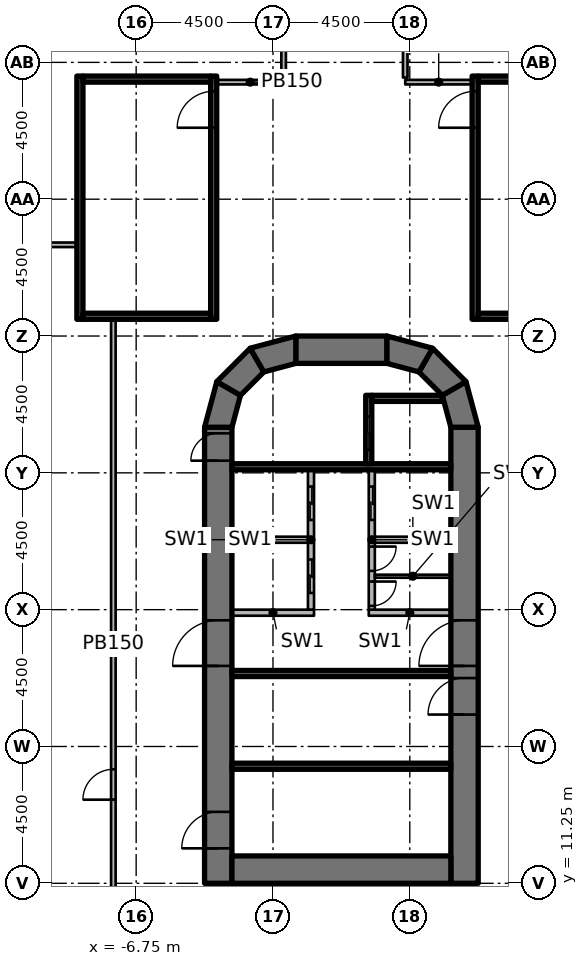
"""IFC4 building model, lengths in metres.
Left out: names, types, materials, properties, quantities, classifications, styles, units other than length and angle.
Written with IfcOpenShell. Run it as: python <this file> out.ifc"""

import sys

from ifc_helpers import new_model, si_unit, direction, frame, frame_2d, origin, origin_2d, place, context, subcontext, project, spatial, polyline, rectangle, outline, extrude, element, fill, save


model = new_model("IFC4")
c1 = context("Model", 3, precision=1e-05, world=origin(), true_north=direction((0.0, 1.0)))
c2 = subcontext(c1, "Body", "Model", "MODEL_VIEW")
j1 = project(units=[si_unit("LENGTHUNIT", "METRE"), si_unit("PLANEANGLEUNIT", "RADIAN")], contexts=[c1])
p1 = place(None, origin())
s1 = spatial("IfcSite", under=j1, at=p1, CompositionType="ELEMENT")
p2 = place(p1, origin())
s2 = spatial("IfcBuilding", under=s1, at=p2, CompositionType="ELEMENT")
p3 = place(p2, frame((0.0, 0.0, 7.0)))
s3 = spatial("IfcBuildingStorey", under=s2, at=p3, CompositionType="ELEMENT", Elevation=7.0)
for number, where, z_axis, x_axis in (
    (1, (-6.25, 10.75, 0.0), (0.0, 0.0, 1.0), (1.0, 0.0, 0.0)),
    (2, (-6.25, 15.75, 0.0), (0.0, 0.0, 1.0), (1.0, 0.0, 0.0)),
    (3, (-6.25, 20.25, 0.0), (0.0, 0.0, 1.0), (1.0, 0.0, 0.0)),
    (4, (-6.25, 24.65, 0.0), (0.0, 0.0, 1.0), (1.0, 0.0, 0.0)),
    (5, (-6.25, 26.7, 0.0), (0.0, 0.0, 1.0), (1.0, 0.0, 0.0)),
    (6, (-2.25, 33.11, 0.0), (0.0, 0.0, 1.0), (1.0, 0.0, 0.0)),
    (7, (2.25, 33.11, 0.0), (0.0, 0.0, 1.0), (1.0, 0.0, 0.0)),
):
    element("IfcColumn", number, at=place(p3, frame(where, z_axis=z_axis, x_axis=x_axis)), inside=s3, PredefinedType="COLUMN", context=c2, shape_type="SweptSolid", body=[
        extrude(rectangle(XDim=1.2, YDim=1.2, at=origin_2d()), origin(), (0.0, 0.0, 1.0), 4.55),
    ])
p4 = place(p3, frame((-4.05, 11.25, 0.0), z_axis=(0.0, 0.0, 1.0), x_axis=(0.0, 1.0, 0.0)))
e8 = element("IfcWall", 8, at=p4, inside=s3, PredefinedType="SHEAR", context=c2, shape_type="SweptSolid", body=[
    extrude(rectangle(XDim=15.0, YDim=0.9, at=frame_2d((7.5, 0.0))), origin(), (0.0, 0.0, 1.0), 5.0),
])
p5 = place(p4, frame((7.15, 0.0, 0.0)))
e9 = element("IfcOpeningElement", 9, at=p5, cuts=e8, PredefinedType="OPENING", context=c2, shape_type="SweptSolid", body=[
    extrude(rectangle(XDim=1.5, YDim=2.3, at=frame_2d((0.75, 1.15))), frame((0.0, 0.46, 0.0), z_axis=(0.0, -1.0, 0.0), x_axis=(1.0, 0.0, 0.0)), (0.0, 0.0, 1.0), 0.92),
])
p6 = place(p4, frame((13.9, 0.0, 0.0)))
e10 = element("IfcOpeningElement", 10, at=p6, cuts=e8, PredefinedType="OPENING", context=c2, shape_type="SweptSolid", body=[
    extrude(rectangle(XDim=0.9, YDim=2.1, at=frame_2d((0.45, 1.05))), frame((0.0, 0.46, 0.0), z_axis=(0.0, -1.0, 0.0), x_axis=(1.0, 0.0, 0.0)), (0.0, 0.0, 1.0), 0.92),
])
p7 = place(p4, frame((1.15, 0.0, 0.0)))
e11 = element("IfcOpeningElement", 11, at=p7, cuts=e8, PredefinedType="OPENING", context=c2, shape_type="SweptSolid", body=[
    extrude(rectangle(XDim=1.2, YDim=2.1, at=frame_2d((0.6, 1.05))), frame((0.0, 0.46, 0.0), z_axis=(0.0, -1.0, 0.0), x_axis=(1.0, 0.0, 0.0)), (0.0, 0.0, 1.0), 0.92),
])
p8 = place(p3, frame((4.05, 11.25, 0.0), z_axis=(0.0, 0.0, 1.0), x_axis=(0.0, 1.0, 0.0)))
e12 = element("IfcWall", 12, at=p8, inside=s3, PredefinedType="SHEAR", context=c2, shape_type="SweptSolid", body=[
    extrude(rectangle(XDim=15.0, YDim=0.9, at=frame_2d((7.5, 0.0))), origin(), (0.0, 0.0, 1.0), 5.0),
])
p9 = place(p8, frame((7.15, 0.0, 0.0)))
e13 = element("IfcOpeningElement", 13, at=p9, cuts=e12, PredefinedType="OPENING", context=c2, shape_type="SweptSolid", body=[
    extrude(rectangle(XDim=1.5, YDim=2.3, at=frame_2d((0.75, 1.15))), frame((0.0, 0.46, 0.0), z_axis=(0.0, -1.0, 0.0), x_axis=(1.0, 0.0, 0.0)), (0.0, 0.0, 1.0), 0.92),
])
p10 = place(p8, frame((5.55, 0.0, 0.0)))
e14 = element("IfcOpeningElement", 14, at=p10, cuts=e12, PredefinedType="OPENING", context=c2, shape_type="SweptSolid", body=[
    extrude(rectangle(XDim=1.2, YDim=2.1, at=frame_2d((0.6, 1.05))), frame((0.0, 0.46, 0.0), z_axis=(0.0, -1.0, 0.0), x_axis=(1.0, 0.0, 0.0)), (0.0, 0.0, 1.0), 0.92),
])
p11 = place(p3, frame((-3.6, 11.7, 0.0), z_axis=(0.0, 0.0, 1.0), x_axis=(1.0, 0.0, 0.0)))
e15 = element("IfcWall", 15, at=p11, inside=s3, PredefinedType="SHEAR", context=c2, shape_type="SweptSolid", body=[
    extrude(rectangle(XDim=7.2, YDim=0.9, at=frame_2d((3.6, 0.0))), origin(), (0.0, 0.0, 1.0), 5.0),
])
p12 = place(p3, frame((-1.5, 28.8, 0.0), z_axis=(0.0, 0.0, 1.0), x_axis=(1.0, 0.0, 0.0)))
e16 = element("IfcWall", 16, at=p12, inside=s3, PredefinedType="SHEAR", context=c2, shape_type="SweptSolid", body=[
    extrude(rectangle(XDim=3.0, YDim=0.9, at=frame_2d((1.5, 0.0))), origin(), (0.0, 0.0, 1.0), 5.0),
])
p13 = place(p3, origin())
e17 = element("IfcWall", 17, at=p13, inside=s3, PredefinedType="SHEAR", context=c2, shape_type="SweptSolid", body=[
    extrude(outline(polyline([(-4.5, 26.25), (-4.098, 27.75), (-3.319, 27.3), (-3.6, 26.25), (-4.5, 26.25)])), origin(), (0.0, 0.0, 1.0), 5.0),
])
p14 = place(p3, origin())
e18 = element("IfcWall", 18, at=p14, inside=s3, PredefinedType="SHEAR", context=c2, shape_type="SweptSolid", body=[
    extrude(outline(polyline([(-4.098, 27.75), (-3.0, 28.848), (-2.55, 28.069), (-3.319, 27.3), (-4.098, 27.75)])), origin(), (0.0, 0.0, 1.0), 5.0),
])
p15 = place(p3, origin())
e19 = element("IfcWall", 19, at=p15, inside=s3, PredefinedType="SHEAR", context=c2, shape_type="SweptSolid", body=[
    extrude(outline(polyline([(-3.0, 28.848), (-1.5, 29.25), (-1.5, 28.35), (-2.55, 28.069), (-3.0, 28.848)])), origin(), (0.0, 0.0, 1.0), 5.0),
])
p16 = place(p3, origin())
e20 = element("IfcWall", 20, at=p16, inside=s3, PredefinedType="SHEAR", context=c2, shape_type="SweptSolid", body=[
    extrude(outline(polyline([(4.5, 26.25), (4.098, 27.75), (3.319, 27.3), (3.6, 26.25), (4.5, 26.25)])), origin(), (0.0, 0.0, 1.0), 5.0),
])
p17 = place(p3, origin())
e21 = element("IfcWall", 21, at=p17, inside=s3, PredefinedType="SHEAR", context=c2, shape_type="SweptSolid", body=[
    extrude(outline(polyline([(4.098, 27.75), (3.0, 28.848), (2.55, 28.069), (3.319, 27.3), (4.098, 27.75)])), origin(), (0.0, 0.0, 1.0), 5.0),
])
p18 = place(p3, origin())
e22 = element("IfcWall", 22, at=p18, inside=s3, PredefinedType="SHEAR", context=c2, shape_type="SweptSolid", body=[
    extrude(outline(polyline([(3.0, 28.848), (1.5, 29.25), (1.5, 28.35), (2.55, 28.069), (3.0, 28.848)])), origin(), (0.0, 0.0, 1.0), 5.0),
])
p19 = place(p3, frame((-3.6, 24.95, 0.0), z_axis=(0.0, 0.0, 1.0), x_axis=(1.0, 0.0, 0.0)))
e23 = element("IfcWall", 23, at=p19, inside=s3, PredefinedType="SHEAR", context=c2, shape_type="SweptSolid", body=[
    extrude(rectangle(XDim=7.2, YDim=0.2, at=frame_2d((3.6, 0.0))), origin(), (0.0, 0.0, 1.0), 4.55),
])
p20 = place(p3, frame((0.9, 27.3, 0.0), z_axis=(0.0, 0.0, 1.0), x_axis=(0.0, -1.0, 0.0)))
e24 = element("IfcWall", 24, at=p20, inside=s3, PredefinedType="SHEAR", context=c2, shape_type="SweptSolid", body=[
    extrude(rectangle(XDim=2.25, YDim=0.2, at=frame_2d((1.125, 0.0))), origin(), (0.0, 0.0, 1.0), 4.55),
])
p21 = place(p20, frame((0.7, 0.0, 0.0)))
e25 = element("IfcOpeningElement", 25, at=p21, cuts=e24, PredefinedType="OPENING", context=c2, shape_type="SweptSolid", body=[
    extrude(rectangle(XDim=1.1, YDim=2.3, at=frame_2d((0.55, 1.15))), frame((0.0, 0.11, 0.0), z_axis=(0.0, -1.0, 0.0), x_axis=(1.0, 0.0, 0.0)), (0.0, 0.0, 1.0), 0.22),
])
p22 = place(p3, origin())
e26 = element("IfcWall", 26, at=p22, inside=s3, PredefinedType="SHEAR", context=c2, shape_type="SweptSolid", body=[
    extrude(outline(polyline([(1.0, 27.1), (3.341, 27.1), (3.291, 27.284), (3.275, 27.3), (1.0, 27.3), (1.0, 27.1)])), origin(), (0.0, 0.0, 1.0), 4.55),
])
for number, where, z_axis, x_axis in (
    (27, (-3.6, 18.15, 0.0), (0.0, 0.0, 1.0), (1.0, 0.0, 0.0)),
    (28, (-3.6, 15.1, 0.0), (0.0, 0.0, 1.0), (1.0, 0.0, 0.0)),
):
    element("IfcWall", number, at=place(p3, frame(where, z_axis=z_axis, x_axis=x_axis)), inside=s3, PredefinedType="SHEAR", context=c2, shape_type="SweptSolid", body=[
        extrude(rectangle(XDim=7.2, YDim=0.2, at=frame_2d((3.6, 0.0))), origin(), (0.0, 0.0, 1.0), 4.55),
    ])
p23 = place(p3, frame((-3.6, 20.15, 0.0), z_axis=(0.0, 0.0, 1.0), x_axis=(1.0, 0.0, 0.0)))
e29 = element("IfcWall", 29, at=p23, inside=s3, PredefinedType="PARTITIONING", context=c2, shape_type="SweptSolid", body=[
    extrude(rectangle(XDim=2.7, YDim=0.2, at=frame_2d((1.35, 0.0))), origin(), (0.0, 0.0, 1.0), 4.55),
])
p24 = place(p3, frame((-1.0, 24.85, 0.0), z_axis=(0.0, 0.0, 1.0), x_axis=(0.0, -1.0, 0.0)))
e30 = element("IfcWall", 30, at=p24, inside=s3, PredefinedType="PARTITIONING", context=c2, shape_type="SweptSolid", body=[
    extrude(rectangle(XDim=4.6, YDim=0.2, at=frame_2d((2.3, 0.0))), origin(), (0.0, 0.0, 1.0), 4.55),
])
p25 = place(p24, frame((0.55, 0.0, 0.0)))
e31 = element("IfcOpeningElement", 31, at=p25, cuts=e30, PredefinedType="OPENING", context=c2, shape_type="SweptSolid", body=[
    extrude(rectangle(XDim=1.1, YDim=2.3, at=frame_2d((0.55, 1.15))), frame((0.0, 0.11, 0.0), z_axis=(0.0, -1.0, 0.0), x_axis=(1.0, 0.0, 0.0)), (0.0, 0.0, 1.0), 0.22),
])
p26 = place(p24, frame((2.95, 0.0, 0.0)))
e32 = element("IfcOpeningElement", 32, at=p26, cuts=e30, PredefinedType="OPENING", context=c2, shape_type="SweptSolid", body=[
    extrude(rectangle(XDim=1.1, YDim=2.3, at=frame_2d((0.55, 1.15))), frame((0.0, 0.11, 0.0), z_axis=(0.0, -1.0, 0.0), x_axis=(1.0, 0.0, 0.0)), (0.0, 0.0, 1.0), 0.22),
])
p27 = place(p3, frame((0.9, 20.15, 0.0), z_axis=(0.0, 0.0, 1.0), x_axis=(1.0, 0.0, 0.0)))
e33 = element("IfcWall", 33, at=p27, inside=s3, PredefinedType="PARTITIONING", context=c2, shape_type="SweptSolid", body=[
    extrude(rectangle(XDim=2.7, YDim=0.2, at=frame_2d((1.35, 0.0))), origin(), (0.0, 0.0, 1.0), 4.55),
])
p28 = place(p3, frame((1.0, 24.85, 0.0), z_axis=(0.0, 0.0, 1.0), x_axis=(0.0, -1.0, 0.0)))
e34 = element("IfcWall", 34, at=p28, inside=s3, PredefinedType="PARTITIONING", context=c2, shape_type="SweptSolid", body=[
    extrude(rectangle(XDim=4.6, YDim=0.2, at=frame_2d((2.3, 0.0))), origin(), (0.0, 0.0, 1.0), 4.55),
])
p29 = place(p28, frame((0.55, 0.0, 0.0)))
e35 = element("IfcOpeningElement", 35, at=p29, cuts=e34, PredefinedType="OPENING", context=c2, shape_type="SweptSolid", body=[
    extrude(rectangle(XDim=1.1, YDim=2.3, at=frame_2d((0.55, 1.15))), frame((0.0, 0.11, 0.0), z_axis=(0.0, -1.0, 0.0), x_axis=(1.0, 0.0, 0.0)), (0.0, 0.0, 1.0), 0.22),
])
p30 = place(p28, frame((2.525, 0.0, 0.0)))
e36 = element("IfcOpeningElement", 36, at=p30, cuts=e34, PredefinedType="OPENING", context=c2, shape_type="SweptSolid", body=[
    extrude(rectangle(XDim=0.8, YDim=2.1, at=frame_2d((0.4, 1.05))), frame((0.0, 0.11, 0.0), z_axis=(0.0, -1.0, 0.0), x_axis=(1.0, 0.0, 0.0)), (0.0, 0.0, 1.0), 0.22),
])
p31 = place(p28, frame((3.675, 0.0, 0.0)))
e37 = element("IfcOpeningElement", 37, at=p31, cuts=e34, PredefinedType="OPENING", context=c2, shape_type="SweptSolid", body=[
    extrude(rectangle(XDim=0.8, YDim=2.1, at=frame_2d((0.4, 1.05))), frame((0.0, 0.11, 0.0), z_axis=(0.0, -1.0, 0.0), x_axis=(1.0, 0.0, 0.0)), (0.0, 0.0, 1.0), 0.22),
])
for number, where, z_axis, x_axis in (
    (38, (-3.6, 22.55, 0.0), (0.0, 0.0, 1.0), (1.0, 0.0, 0.0)),
    (39, (1.1, 22.55, 0.0), (0.0, 0.0, 1.0), (1.0, 0.0, 0.0)),
):
    element("IfcWall", number, at=place(p3, frame(where, z_axis=z_axis, x_axis=x_axis)), inside=s3, PredefinedType="PARTITIONING", context=c2, shape_type="SweptSolid", body=[
        extrude(rectangle(XDim=2.5, YDim=0.2, at=frame_2d((1.25, 0.0))), origin(), (0.0, 0.0, 1.0), 4.55),
    ])
p32 = place(p3, frame((1.1, 21.35, 0.0), z_axis=(0.0, 0.0, 1.0), x_axis=(1.0, 0.0, 0.0)))
e40 = element("IfcWall", 40, at=p32, inside=s3, PredefinedType="PARTITIONING", context=c2, shape_type="SweptSolid", body=[
    extrude(rectangle(XDim=2.5, YDim=0.1, at=frame_2d((1.25, 0.0))), origin(), (0.0, 0.0, 1.0), 4.55),
])
p33 = place(p3, frame((-8.6, 29.8, 0.0), z_axis=(0.0, 0.0, 1.0), x_axis=(0.0, 1.0, 0.0)))
e41 = element("IfcWall", 41, at=p33, inside=s3, PredefinedType="SHEAR", context=c2, shape_type="SweptSolid", body=[
    extrude(rectangle(XDim=8.0, YDim=0.2, at=frame_2d((4.0, 0.0))), origin(), (0.0, 0.0, 1.0), 4.55),
])
p34 = place(p3, frame((-4.2, 29.8, 0.0), z_axis=(0.0, 0.0, 1.0), x_axis=(0.0, 1.0, 0.0)))
e42 = element("IfcWall", 42, at=p34, inside=s3, PredefinedType="SHEAR", context=c2, shape_type="SweptSolid", body=[
    extrude(rectangle(XDim=8.0, YDim=0.2, at=frame_2d((4.0, 0.0))), origin(), (0.0, 0.0, 1.0), 4.55),
])
p35 = place(p34, frame((6.3, 0.0, 0.0)))
e43 = element("IfcOpeningElement", 43, at=p35, cuts=e42, PredefinedType="OPENING", context=c2, shape_type="SweptSolid", body=[
    extrude(rectangle(XDim=1.2, YDim=2.1, at=frame_2d((0.6, 1.05))), frame((0.0, 0.11, 0.0), z_axis=(0.0, -1.0, 0.0), x_axis=(1.0, 0.0, 0.0)), (0.0, 0.0, 1.0), 0.22),
])
for number, where, z_axis, x_axis in (
    (44, (-8.5, 29.9, 0.0), (0.0, 0.0, 1.0), (1.0, 0.0, 0.0)),
    (45, (-8.5, 37.7, 0.0), (0.0, 0.0, 1.0), (1.0, 0.0, 0.0)),
):
    element("IfcWall", number, at=place(p3, frame(where, z_axis=z_axis, x_axis=x_axis)), inside=s3, PredefinedType="SHEAR", context=c2, shape_type="SweptSolid", body=[
        extrude(rectangle(XDim=4.2, YDim=0.2, at=frame_2d((2.1, 0.0))), origin(), (0.0, 0.0, 1.0), 4.55),
    ])
p36 = place(p3, frame((4.4, 29.8, 0.0), z_axis=(0.0, 0.0, 1.0), x_axis=(0.0, 1.0, 0.0)))
e46 = element("IfcWall", 46, at=p36, inside=s3, PredefinedType="SHEAR", context=c2, shape_type="SweptSolid", body=[
    extrude(rectangle(XDim=8.0, YDim=0.2, at=frame_2d((4.0, 0.0))), origin(), (0.0, 0.0, 1.0), 4.55),
])
p37 = place(p36, frame((6.3, 0.0, 0.0)))
e47 = element("IfcOpeningElement", 47, at=p37, cuts=e46, PredefinedType="OPENING", context=c2, shape_type="SweptSolid", body=[
    extrude(rectangle(XDim=1.2, YDim=2.1, at=frame_2d((0.6, 1.05))), frame((0.0, 0.11, 0.0), z_axis=(0.0, -1.0, 0.0), x_axis=(1.0, 0.0, 0.0)), (0.0, 0.0, 1.0), 0.22),
])
for number, where, z_axis, x_axis in (
    (48, (4.5, 29.9, 0.0), (0.0, 0.0, 1.0), (1.0, 0.0, 0.0)),
    (49, (4.5, 37.7, 0.0), (0.0, 0.0, 1.0), (1.0, 0.0, 0.0)),
):
    element("IfcWall", number, at=place(p3, frame(where, z_axis=z_axis, x_axis=x_axis)), inside=s3, PredefinedType="SHEAR", context=c2, shape_type="SweptSolid", body=[
        extrude(rectangle(XDim=4.2, YDim=0.2, at=frame_2d((2.1, 0.0))), origin(), (0.0, 0.0, 1.0), 4.55),
    ])
p38 = place(p3, frame((-4.1, 37.6, 0.0), z_axis=(0.0, 0.0, 1.0), x_axis=(1.0, 0.0, 0.0)))
e50 = element("IfcWall", 50, at=p38, inside=s3, PredefinedType="PARTITIONING", context=c2, shape_type="SweptSolid", body=[
    extrude(rectangle(XDim=2.2, YDim=0.15, at=frame_2d((1.1, 0.0))), origin(), (0.0, 0.0, 1.0), 4.55),
])
p39 = place(p3, frame((2.1, 37.6, 0.0), z_axis=(0.0, 0.0, 1.0), x_axis=(1.0, 0.0, 0.0)))
e51 = element("IfcWall", 51, at=p39, inside=s3, PredefinedType="PARTITIONING", context=c2, shape_type="SweptSolid", body=[
    extrude(rectangle(XDim=2.2, YDim=0.15, at=frame_2d((1.1, 0.0))), origin(), (0.0, 0.0, 1.0), 4.55),
])
p40 = place(p3, frame((-7.5, 8.25, 0.0), z_axis=(0.0, 0.0, 1.0), x_axis=(0.0, 1.0, 0.0)))
e52 = element("IfcWall", 52, at=p40, inside=s3, PredefinedType="PARTITIONING", context=c2, shape_type="SweptSolid", body=[
    extrude(rectangle(XDim=21.75, YDim=0.15, at=frame_2d((10.875, 0.0))), origin(), (0.0, 0.0, 1.0), 4.55),
])
p41 = place(p40, frame((5.75, 0.0, 0.0)))
e53 = element("IfcOpeningElement", 53, at=p41, cuts=e52, PredefinedType="OPENING", context=c2, shape_type="SweptSolid", body=[
    extrude(rectangle(XDim=1.0, YDim=2.1, at=frame_2d((0.5, 1.05))), frame((0.0, 0.085, 0.0), z_axis=(0.0, -1.0, 0.0), x_axis=(1.0, 0.0, 0.0)), (0.0, 0.0, 1.0), 0.17),
])
p42 = place(p3, frame((2.1, 41.55, 0.0), z_axis=(0.0, 0.0, 1.0), x_axis=(0.0, -1.0, 0.0)))
e54 = element("IfcWall", 54, at=p42, inside=s3, PredefinedType="PARTITIONING", context=c2, shape_type="SweptSolid", body=[
    extrude(rectangle(XDim=3.8, YDim=0.15, at=frame_2d((1.9, 0.0))), origin(), (0.0, 0.0, 1.0), 4.55),
])
p43 = place(p3, frame((-1.9, 37.75, 0.0), z_axis=(0.0, 0.0, 1.0), x_axis=(0.0, 1.0, 0.0)))
e55 = element("IfcWall", 55, at=p43, inside=s3, PredefinedType="PARTITIONING", context=c2, shape_type="SweptSolid", body=[
    extrude(rectangle(XDim=8.3, YDim=0.15, at=frame_2d((4.15, 0.0))), origin(), (0.0, 0.0, 1.0), 4.55),
])
p44 = place(p43, frame((2.267, 0.0, 0.0)))
e56 = element("IfcOpeningElement", 56, at=p44, cuts=e55, PredefinedType="OPENING", context=c2, shape_type="SweptSolid", body=[
    extrude(rectangle(XDim=1.0, YDim=2.1, at=frame_2d((0.5, 1.05))), frame((0.0, 0.085, 0.0), z_axis=(0.0, -1.0, 0.0), x_axis=(1.0, 0.0, 0.0)), (0.0, 0.0, 1.0), 0.17),
])
p45 = place(p3, frame((-24.15, 32.25, 0.0), z_axis=(0.0, 0.0, 1.0), x_axis=(1.0, 0.0, 0.0)))
e57 = element("IfcWall", 57, at=p45, inside=s3, PredefinedType="PARTITIONING", context=c2, shape_type="SweptSolid", body=[
    extrude(rectangle(XDim=15.45, YDim=0.15, at=frame_2d((7.725, 0.0))), origin(), (0.0, 0.0, 1.0), 4.55),
])
p46 = place(p5, origin())
e58 = element("IfcDoor", 58, at=p46, inside=s3, OperationType="DOUBLE_DOOR_SINGLE_SWING", PredefinedType="DOOR", context=c2, shape_type="SweptSolid", body=[
    extrude(rectangle(XDim=1.5, YDim=2.3, at=frame_2d((0.75, 1.15))), frame((0.0, 0.025, 0.0), z_axis=(0.0, -1.0, 0.0), x_axis=(1.0, 0.0, 0.0)), (0.0, 0.0, 1.0), 0.05),
])
fill(e9, e58)
p47 = place(p9, origin())
e59 = element("IfcDoor", 59, at=p47, inside=s3, OperationType="DOUBLE_DOOR_SINGLE_SWING", PredefinedType="DOOR", context=c2, shape_type="SweptSolid", body=[
    extrude(rectangle(XDim=1.5, YDim=2.3, at=frame_2d((0.75, 1.15))), frame((0.0, 0.025, 0.0), z_axis=(0.0, -1.0, 0.0), x_axis=(1.0, 0.0, 0.0)), (0.0, 0.0, 1.0), 0.05),
])
fill(e13, e59)
p48 = place(p6, origin())
e60 = element("IfcDoor", 60, at=p48, inside=s3, OperationType="SINGLE_SWING_LEFT", PredefinedType="DOOR", context=c2, shape_type="SweptSolid", body=[
    extrude(rectangle(XDim=0.9, YDim=2.1, at=frame_2d((0.45, 1.05))), frame((0.0, 0.025, 0.0), z_axis=(0.0, -1.0, 0.0), x_axis=(1.0, 0.0, 0.0)), (0.0, 0.0, 1.0), 0.05),
])
fill(e10, e60)
p49 = place(p10, origin())
e61 = element("IfcDoor", 61, at=p49, inside=s3, OperationType="SINGLE_SWING_LEFT", PredefinedType="DOOR", context=c2, shape_type="SweptSolid", body=[
    extrude(rectangle(XDim=1.2, YDim=2.1, at=frame_2d((0.6, 1.05))), frame((0.0, 0.025, 0.0), z_axis=(0.0, -1.0, 0.0), x_axis=(1.0, 0.0, 0.0)), (0.0, 0.0, 1.0), 0.05),
])
fill(e14, e61)
p50 = place(p7, origin())
e62 = element("IfcDoor", 62, at=p50, inside=s3, OperationType="SINGLE_SWING_LEFT", PredefinedType="DOOR", context=c2, shape_type="SweptSolid", body=[
    extrude(rectangle(XDim=1.2, YDim=2.1, at=frame_2d((0.6, 1.05))), frame((0.0, 0.025, 0.0), z_axis=(0.0, -1.0, 0.0), x_axis=(1.0, 0.0, 0.0)), (0.0, 0.0, 1.0), 0.05),
])
fill(e11, e62)
p51 = place(p21, origin())
e63 = element("IfcDoor", 63, at=p51, inside=s3, OperationType="DOUBLE_DOOR_SLIDING", PredefinedType="DOOR", context=c2, shape_type="SweptSolid", body=[
    extrude(rectangle(XDim=1.1, YDim=2.3, at=frame_2d((0.55, 1.15))), frame((0.0, 0.025, 0.0), z_axis=(0.0, -1.0, 0.0), x_axis=(1.0, 0.0, 0.0)), (0.0, 0.0, 1.0), 0.05),
])
fill(e25, e63)
p52 = place(p25, origin())
e64 = element("IfcDoor", 64, at=p52, inside=s3, OperationType="DOUBLE_DOOR_SLIDING", PredefinedType="DOOR", context=c2, shape_type="SweptSolid", body=[
    extrude(rectangle(XDim=1.1, YDim=2.3, at=frame_2d((0.55, 1.15))), frame((0.0, 0.025, 0.0), z_axis=(0.0, -1.0, 0.0), x_axis=(1.0, 0.0, 0.0)), (0.0, 0.0, 1.0), 0.05),
])
fill(e31, e64)
p53 = place(p26, origin())
e65 = element("IfcDoor", 65, at=p53, inside=s3, OperationType="DOUBLE_DOOR_SLIDING", PredefinedType="DOOR", context=c2, shape_type="SweptSolid", body=[
    extrude(rectangle(XDim=1.1, YDim=2.3, at=frame_2d((0.55, 1.15))), frame((0.0, 0.025, 0.0), z_axis=(0.0, -1.0, 0.0), x_axis=(1.0, 0.0, 0.0)), (0.0, 0.0, 1.0), 0.05),
])
fill(e32, e65)
p54 = place(p29, origin())
e66 = element("IfcDoor", 66, at=p54, inside=s3, OperationType="DOUBLE_DOOR_SLIDING", PredefinedType="DOOR", context=c2, shape_type="SweptSolid", body=[
    extrude(rectangle(XDim=1.1, YDim=2.3, at=frame_2d((0.55, 1.15))), frame((0.0, 0.025, 0.0), z_axis=(0.0, -1.0, 0.0), x_axis=(1.0, 0.0, 0.0)), (0.0, 0.0, 1.0), 0.05),
])
fill(e35, e66)
p55 = place(p30, origin())
e67 = element("IfcDoor", 67, at=p55, inside=s3, OperationType="SINGLE_SWING_RIGHT", PredefinedType="DOOR", context=c2, shape_type="SweptSolid", body=[
    extrude(rectangle(XDim=0.8, YDim=2.1, at=frame_2d((0.4, 1.05))), frame((0.0, 0.025, 0.0), z_axis=(0.0, -1.0, 0.0), x_axis=(1.0, 0.0, 0.0)), (0.0, 0.0, 1.0), 0.05),
])
fill(e36, e67)
p56 = place(p31, origin())
e68 = element("IfcDoor", 68, at=p56, inside=s3, OperationType="SINGLE_SWING_LEFT", PredefinedType="DOOR", context=c2, shape_type="SweptSolid", body=[
    extrude(rectangle(XDim=0.8, YDim=2.1, at=frame_2d((0.4, 1.05))), frame((0.0, 0.025, 0.0), z_axis=(0.0, -1.0, 0.0), x_axis=(1.0, 0.0, 0.0)), (0.0, 0.0, 1.0), 0.05),
])
fill(e37, e68)
p57 = place(p35, origin())
e69 = element("IfcDoor", 69, at=p57, inside=s3, OperationType="SINGLE_SWING_RIGHT", PredefinedType="DOOR", context=c2, shape_type="SweptSolid", body=[
    extrude(rectangle(XDim=1.2, YDim=2.1, at=frame_2d((0.6, 1.05))), frame((0.0, 0.025, 0.0), z_axis=(0.0, -1.0, 0.0), x_axis=(1.0, 0.0, 0.0)), (0.0, 0.0, 1.0), 0.05),
])
fill(e43, e69)
p58 = place(p37, origin())
e70 = element("IfcDoor", 70, at=p58, inside=s3, OperationType="SINGLE_SWING_LEFT", PredefinedType="DOOR", context=c2, shape_type="SweptSolid", body=[
    extrude(rectangle(XDim=1.2, YDim=2.1, at=frame_2d((0.6, 1.05))), frame((0.0, 0.025, 0.0), z_axis=(0.0, -1.0, 0.0), x_axis=(1.0, 0.0, 0.0)), (0.0, 0.0, 1.0), 0.05),
])
fill(e47, e70)
p59 = place(p41, origin())
e71 = element("IfcDoor", 71, at=p59, inside=s3, OperationType="SINGLE_SWING_LEFT", PredefinedType="DOOR", context=c2, shape_type="SweptSolid", body=[
    extrude(rectangle(XDim=1.0, YDim=2.1, at=frame_2d((0.5, 1.05))), frame((0.0, 0.025, 0.0), z_axis=(0.0, -1.0, 0.0), x_axis=(1.0, 0.0, 0.0)), (0.0, 0.0, 1.0), 0.05),
])
fill(e53, e71)
save(model, sys.argv[1])
